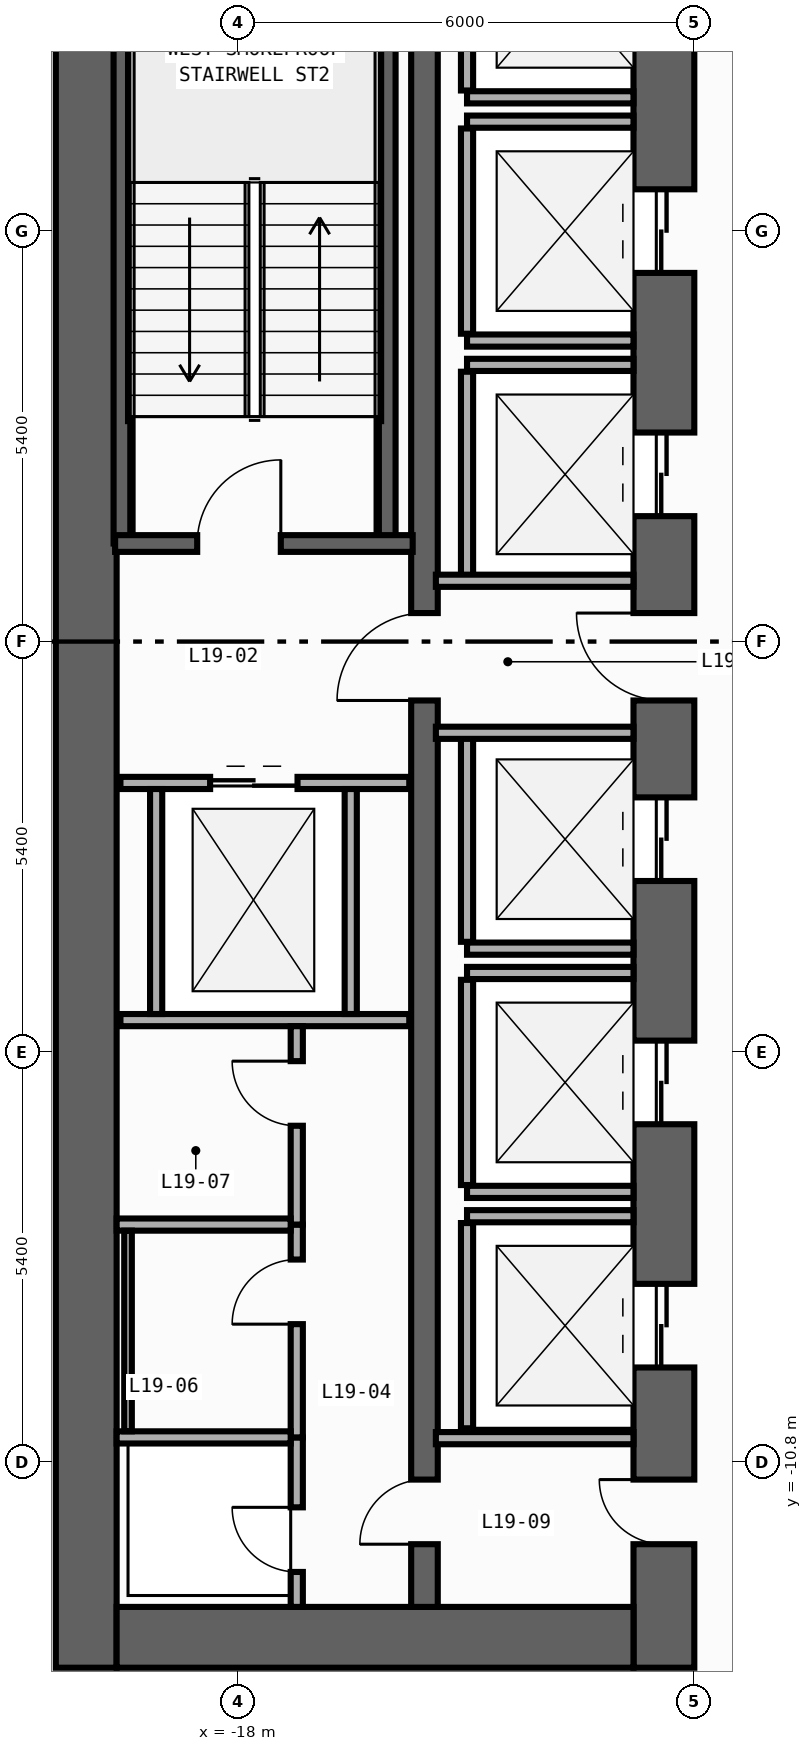
"""IFC4 building model, lengths in metres.
Left out: names, types, materials, properties, quantities, classifications, styles, units other than length and angle.
Written with IfcOpenShell. Run it as: python <this file> out.ifc"""

import sys

from ifc_helpers import new_model, si_unit, direction, frame, frame_2d, origin, place, context, subcontext, project, spatial, rectangle, extrude, element, fill, save


model = new_model("IFC4")
c1 = context("Model", 3, precision=1e-05, world=origin(), true_north=direction((0.0, 1.0)))
c2 = subcontext(c1, "Body", "Model", "MODEL_VIEW")
j1 = project(units=[si_unit("LENGTHUNIT", "METRE"), si_unit("PLANEANGLEUNIT", "RADIAN")], contexts=[c1])
p1 = place(None, origin())
s1 = spatial("IfcSite", under=j1, at=p1, CompositionType="ELEMENT")
p2 = place(p1, origin())
s2 = spatial("IfcBuilding", under=s1, at=p2, CompositionType="ELEMENT")
p3 = place(p2, frame((0.0, 0.0, 80.6)))
s3 = spatial("IfcBuildingStorey", under=s2, at=p3, CompositionType="ELEMENT", Elevation=80.6)
p4 = place(p3, frame((-20.0, -13.5, 0.0), z_axis=(0.0, 0.0, 1.0), x_axis=(0.0, 1.0, 0.0)))
e1 = element("IfcWall", 1, at=p4, inside=s3, PredefinedType="SHEAR", context=c2, shape_type="SweptSolid", body=[
    extrude(rectangle(XDim=27.0, YDim=0.8, at=frame_2d((13.5, 0.0))), origin(), (0.0, 0.0, 1.0), 3.85),
])
p5 = place(p3, frame((-12.4, -13.5, 0.0), z_axis=(0.0, 0.0, 1.0), x_axis=(0.0, 1.0, 0.0)))
e2 = element("IfcWall", 2, at=p5, inside=s3, PredefinedType="SHEAR", context=c2, shape_type="SweptSolid", body=[
    extrude(rectangle(XDim=27.0, YDim=0.8, at=frame_2d((13.5, 0.0))), origin(), (0.0, 0.0, 1.0), 3.85),
])
p6 = place(p5, frame((21.55, 0.0, 0.0)))
e3 = element("IfcOpeningElement", 3, at=p6, cuts=e2, PredefinedType="OPENING", context=c2, shape_type="SweptSolid", body=[
    extrude(rectangle(XDim=1.1, YDim=2.2, at=frame_2d((0.55, 1.1))), frame((0.0, 0.41, 0.0), z_axis=(0.0, -1.0, 0.0), x_axis=(1.0, 0.0, 0.0)), (0.0, 0.0, 1.0), 0.82),
])
p7 = place(p5, frame((18.35, 0.0, 0.0)))
e4 = element("IfcOpeningElement", 4, at=p7, cuts=e2, PredefinedType="OPENING", context=c2, shape_type="SweptSolid", body=[
    extrude(rectangle(XDim=1.1, YDim=2.2, at=frame_2d((0.55, 1.1))), frame((0.0, 0.41, 0.0), z_axis=(0.0, -1.0, 0.0), x_axis=(1.0, 0.0, 0.0)), (0.0, 0.0, 1.0), 0.82),
])
p8 = place(p5, frame((15.15, 0.0, 0.0)))
e5 = element("IfcOpeningElement", 5, at=p8, cuts=e2, PredefinedType="OPENING", context=c2, shape_type="SweptSolid", body=[
    extrude(rectangle(XDim=1.1, YDim=2.2, at=frame_2d((0.55, 1.1))), frame((0.0, 0.41, 0.0), z_axis=(0.0, -1.0, 0.0), x_axis=(1.0, 0.0, 0.0)), (0.0, 0.0, 1.0), 0.82),
])
p9 = place(p5, frame((10.35, 0.0, 0.0)))
e6 = element("IfcOpeningElement", 6, at=p9, cuts=e2, PredefinedType="OPENING", context=c2, shape_type="SweptSolid", body=[
    extrude(rectangle(XDim=1.1, YDim=2.2, at=frame_2d((0.55, 1.1))), frame((0.0, 0.41, 0.0), z_axis=(0.0, -1.0, 0.0), x_axis=(1.0, 0.0, 0.0)), (0.0, 0.0, 1.0), 0.82),
])
p10 = place(p5, frame((7.15, 0.0, 0.0)))
e7 = element("IfcOpeningElement", 7, at=p10, cuts=e2, PredefinedType="OPENING", context=c2, shape_type="SweptSolid", body=[
    extrude(rectangle(XDim=1.1, YDim=2.2, at=frame_2d((0.55, 1.1))), frame((0.0, 0.41, 0.0), z_axis=(0.0, -1.0, 0.0), x_axis=(1.0, 0.0, 0.0)), (0.0, 0.0, 1.0), 0.82),
])
p11 = place(p5, frame((3.95, 0.0, 0.0)))
e8 = element("IfcOpeningElement", 8, at=p11, cuts=e2, PredefinedType="OPENING", context=c2, shape_type="SweptSolid", body=[
    extrude(rectangle(XDim=1.1, YDim=2.2, at=frame_2d((0.55, 1.1))), frame((0.0, 0.41, 0.0), z_axis=(0.0, -1.0, 0.0), x_axis=(1.0, 0.0, 0.0)), (0.0, 0.0, 1.0), 0.82),
])
p12 = place(p5, frame((12.725, 0.0, 0.0)))
e9 = element("IfcOpeningElement", 9, at=p12, cuts=e2, PredefinedType="OPENING", context=c2, shape_type="SweptSolid", body=[
    extrude(rectangle(XDim=1.15, YDim=2.2, at=frame_2d((0.575, 1.1))), frame((0.0, 0.41, 0.0), z_axis=(0.0, -1.0, 0.0), x_axis=(1.0, 0.0, 0.0)), (0.0, 0.0, 1.0), 0.82),
])
p13 = place(p5, frame((1.625, 0.0, 0.0)))
e10 = element("IfcOpeningElement", 10, at=p13, cuts=e2, PredefinedType="OPENING", context=c2, shape_type="SweptSolid", body=[
    extrude(rectangle(XDim=0.85, YDim=2.1, at=frame_2d((0.425, 1.05))), frame((0.0, 0.41, 0.0), z_axis=(0.0, -1.0, 0.0), x_axis=(1.0, 0.0, 0.0)), (0.0, 0.0, 1.0), 0.82),
])
p14 = place(p3, frame((-19.6, -13.1, 0.0), z_axis=(0.0, 0.0, 1.0), x_axis=(1.0, 0.0, 0.0)))
e11 = element("IfcWall", 11, at=p14, inside=s3, PredefinedType="SHEAR", context=c2, shape_type="SweptSolid", body=[
    extrude(rectangle(XDim=6.8, YDim=0.8, at=frame_2d((3.4, 0.0))), origin(), (0.0, 0.0, 1.0), 3.85),
])
p15 = place(p3, frame((-15.55, -12.7, 0.0), z_axis=(0.0, 0.0, 1.0), x_axis=(0.0, 1.0, 0.0)))
e12 = element("IfcWall", 12, at=p15, inside=s3, PredefinedType="SHEAR", context=c2, shape_type="SweptSolid", body=[
    extrude(rectangle(XDim=25.4, YDim=0.35, at=frame_2d((12.7, 0.0))), origin(), (0.0, 0.0, 1.0), 3.85),
])
p16 = place(p15, frame((11.925, 0.0, 0.0)))
e13 = element("IfcOpeningElement", 13, at=p16, cuts=e12, PredefinedType="OPENING", context=c2, shape_type="SweptSolid", body=[
    extrude(rectangle(XDim=1.15, YDim=2.2, at=frame_2d((0.575, 1.1))), frame((0.0, 0.185, 0.0), z_axis=(0.0, -1.0, 0.0), x_axis=(1.0, 0.0, 0.0)), (0.0, 0.0, 1.0), 0.37),
])
p17 = place(p15, frame((0.825, 0.0, 0.0)))
e14 = element("IfcOpeningElement", 14, at=p17, cuts=e12, PredefinedType="OPENING", context=c2, shape_type="SweptSolid", body=[
    extrude(rectangle(XDim=0.85, YDim=2.1, at=frame_2d((0.425, 1.05))), frame((0.0, 0.185, 0.0), z_axis=(0.0, -1.0, 0.0), x_axis=(1.0, 0.0, 0.0)), (0.0, 0.0, 1.0), 0.37),
])
for number, where, z_axis, x_axis in (
    (15, (-16.04, 1.29, 0.0), (0.0, 0.0, 1.0), (0.0, 1.0, 0.0)),
    (16, (-19.53, 1.29, 0.0), (0.0, 0.0, 1.0), (0.0, 1.0, 0.0)),
):
    element("IfcWall", number, at=place(p3, frame(where, z_axis=z_axis, x_axis=x_axis)), inside=s3, PredefinedType="SHEAR", context=c2, shape_type="SweptSolid", body=[
        extrude(rectangle(XDim=11.3, YDim=0.22, at=frame_2d((5.65, 0.0))), origin(), (0.0, 0.0, 1.0), 3.85),
    ])
p18 = place(p3, frame((-19.62, 1.29, 0.0), z_axis=(0.0, 0.0, 1.0), x_axis=(1.0, 0.0, 0.0)))
e17 = element("IfcWall", 17, at=p18, inside=s3, PredefinedType="SHEAR", context=c2, shape_type="SweptSolid", body=[
    extrude(rectangle(XDim=3.915, YDim=0.22, at=frame_2d((1.958, 0.0))), origin(), (0.0, 0.0, 1.0), 3.85),
])
p19 = place(p18, frame((1.08, 0.0, 0.0)))
e18 = element("IfcOpeningElement", 18, at=p19, cuts=e17, PredefinedType="OPENING", context=c2, shape_type="SweptSolid", body=[
    extrude(rectangle(XDim=1.1, YDim=2.2, at=frame_2d((0.55, 1.1))), frame((0.0, 0.12, 0.0), z_axis=(0.0, -1.0, 0.0), x_axis=(1.0, 0.0, 0.0)), (0.0, 0.0, 1.0), 0.24),
])
p20 = place(p3, frame((-14.99, 7.16, 0.0), z_axis=(0.0, 0.0, 1.0), x_axis=(1.0, 0.0, 0.0)))
e19 = element("IfcWall", 19, at=p20, inside=s3, PredefinedType="STANDARD", context=c2, shape_type="SweptSolid", body=[
    extrude(rectangle(XDim=2.19, YDim=0.16, at=frame_2d((1.095, 0.0))), origin(), (0.0, 0.0, 1.0), 3.85),
])
p21 = place(p3, frame((-14.99, 7.25, 0.0), z_axis=(0.0, 0.0, 1.0), x_axis=(0.0, 1.0, 0.0)))
e20 = element("IfcWall", 20, at=p21, inside=s3, PredefinedType="STANDARD", context=c2, shape_type="SweptSolid", body=[
    extrude(rectangle(XDim=2.7, YDim=0.16, at=frame_2d((1.35, 0.0))), origin(), (0.0, 0.0, 1.0), 3.85),
])
for number, where, z_axis, x_axis in (
    (21, (-14.99, 3.96, 0.0), (0.0, 0.0, 1.0), (1.0, 0.0, 0.0)),
    (22, (-14.99, 6.84, 0.0), (0.0, 0.0, 1.0), (1.0, 0.0, 0.0)),
):
    element("IfcWall", number, at=place(p3, frame(where, z_axis=z_axis, x_axis=x_axis)), inside=s3, PredefinedType="STANDARD", context=c2, shape_type="SweptSolid", body=[
        extrude(rectangle(XDim=2.19, YDim=0.16, at=frame_2d((1.095, 0.0))), origin(), (0.0, 0.0, 1.0), 3.85),
    ])
p22 = place(p3, frame((-14.99, 4.05, 0.0), z_axis=(0.0, 0.0, 1.0), x_axis=(0.0, 1.0, 0.0)))
e23 = element("IfcWall", 23, at=p22, inside=s3, PredefinedType="STANDARD", context=c2, shape_type="SweptSolid", body=[
    extrude(rectangle(XDim=2.7, YDim=0.16, at=frame_2d((1.35, 0.0))), origin(), (0.0, 0.0, 1.0), 3.85),
])
p23 = place(p3, frame((-14.99, 3.64, 0.0), z_axis=(0.0, 0.0, 1.0), x_axis=(1.0, 0.0, 0.0)))
e24 = element("IfcWall", 24, at=p23, inside=s3, PredefinedType="STANDARD", context=c2, shape_type="SweptSolid", body=[
    extrude(rectangle(XDim=2.19, YDim=0.16, at=frame_2d((1.095, 0.0))), origin(), (0.0, 0.0, 1.0), 3.85),
])
p24 = place(p3, frame((-14.99, 0.85, 0.0), z_axis=(0.0, 0.0, 1.0), x_axis=(0.0, 1.0, 0.0)))
e25 = element("IfcWall", 25, at=p24, inside=s3, PredefinedType="STANDARD", context=c2, shape_type="SweptSolid", body=[
    extrude(rectangle(XDim=2.7, YDim=0.16, at=frame_2d((1.35, 0.0))), origin(), (0.0, 0.0, 1.0), 3.85),
])
p25 = place(p3, frame((-14.99, -4.04, 0.0), z_axis=(0.0, 0.0, 1.0), x_axis=(1.0, 0.0, 0.0)))
e26 = element("IfcWall", 26, at=p25, inside=s3, PredefinedType="STANDARD", context=c2, shape_type="SweptSolid", body=[
    extrude(rectangle(XDim=2.19, YDim=0.16, at=frame_2d((1.095, 0.0))), origin(), (0.0, 0.0, 1.0), 3.85),
])
p26 = place(p3, frame((-14.99, -3.95, 0.0), z_axis=(0.0, 0.0, 1.0), x_axis=(0.0, 1.0, 0.0)))
e27 = element("IfcWall", 27, at=p26, inside=s3, PredefinedType="STANDARD", context=c2, shape_type="SweptSolid", body=[
    extrude(rectangle(XDim=2.7, YDim=0.16, at=frame_2d((1.35, 0.0))), origin(), (0.0, 0.0, 1.0), 3.85),
])
for number, where, z_axis, x_axis in (
    (28, (-14.99, -7.24, 0.0), (0.0, 0.0, 1.0), (1.0, 0.0, 0.0)),
    (29, (-14.99, -4.36, 0.0), (0.0, 0.0, 1.0), (1.0, 0.0, 0.0)),
):
    element("IfcWall", number, at=place(p3, frame(where, z_axis=z_axis, x_axis=x_axis)), inside=s3, PredefinedType="STANDARD", context=c2, shape_type="SweptSolid", body=[
        extrude(rectangle(XDim=2.19, YDim=0.16, at=frame_2d((1.095, 0.0))), origin(), (0.0, 0.0, 1.0), 3.85),
    ])
p27 = place(p3, frame((-14.99, -7.15, 0.0), z_axis=(0.0, 0.0, 1.0), x_axis=(0.0, 1.0, 0.0)))
e30 = element("IfcWall", 30, at=p27, inside=s3, PredefinedType="STANDARD", context=c2, shape_type="SweptSolid", body=[
    extrude(rectangle(XDim=2.7, YDim=0.16, at=frame_2d((1.35, 0.0))), origin(), (0.0, 0.0, 1.0), 3.85),
])
p28 = place(p3, frame((-14.99, -7.56, 0.0), z_axis=(0.0, 0.0, 1.0), x_axis=(1.0, 0.0, 0.0)))
e31 = element("IfcWall", 31, at=p28, inside=s3, PredefinedType="STANDARD", context=c2, shape_type="SweptSolid", body=[
    extrude(rectangle(XDim=2.19, YDim=0.16, at=frame_2d((1.095, 0.0))), origin(), (0.0, 0.0, 1.0), 3.85),
])
p29 = place(p3, frame((-14.99, -10.35, 0.0), z_axis=(0.0, 0.0, 1.0), x_axis=(0.0, 1.0, 0.0)))
e32 = element("IfcWall", 32, at=p29, inside=s3, PredefinedType="STANDARD", context=c2, shape_type="SweptSolid", body=[
    extrude(rectangle(XDim=2.7, YDim=0.16, at=frame_2d((1.35, 0.0))), origin(), (0.0, 0.0, 1.0), 3.85),
])
p30 = place(p3, frame((-19.55, -1.86, 0.0), z_axis=(0.0, 0.0, 1.0), x_axis=(1.0, 0.0, 0.0)))
e33 = element("IfcWall", 33, at=p30, inside=s3, PredefinedType="STANDARD", context=c2, shape_type="SweptSolid", body=[
    extrude(rectangle(XDim=3.8, YDim=0.16, at=frame_2d((1.9, 0.0))), origin(), (0.0, 0.0, 1.0), 3.85),
])
p31 = place(p30, frame((1.18, 0.0, 0.0)))
e34 = element("IfcOpeningElement", 34, at=p31, cuts=e33, PredefinedType="OPENING", context=c2, shape_type="SweptSolid", body=[
    extrude(rectangle(XDim=1.15, YDim=2.2, at=frame_2d((0.575, 1.1))), frame((0.0, 0.09, 0.0), z_axis=(0.0, -1.0, 0.0), x_axis=(1.0, 0.0, 0.0)), (0.0, 0.0, 1.0), 0.18),
])
p32 = place(p3, frame((-19.55, -4.98, 0.0), z_axis=(0.0, 0.0, 1.0), x_axis=(1.0, 0.0, 0.0)))
e35 = element("IfcWall", 35, at=p32, inside=s3, PredefinedType="STANDARD", context=c2, shape_type="SweptSolid", body=[
    extrude(rectangle(XDim=3.8, YDim=0.16, at=frame_2d((1.9, 0.0))), origin(), (0.0, 0.0, 1.0), 3.85),
])
for number, where, z_axis, x_axis in (
    (36, (-19.08, -4.9, 0.0), (0.0, 0.0, 1.0), (0.0, 1.0, 0.0)),
    (37, (-16.52, -4.9, 0.0), (0.0, 0.0, 1.0), (0.0, 1.0, 0.0)),
):
    element("IfcWall", number, at=place(p3, frame(where, z_axis=z_axis, x_axis=x_axis)), inside=s3, PredefinedType="STANDARD", context=c2, shape_type="SweptSolid", body=[
        extrude(rectangle(XDim=2.96, YDim=0.16, at=frame_2d((1.48, 0.0))), origin(), (0.0, 0.0, 1.0), 3.85),
    ])
for number, where, z_axis, x_axis in (
    (38, (-15.4, 0.8, 0.0), (0.0, 0.0, 1.0), (1.0, 0.0, 0.0)),
    (39, (-15.4, -1.2, 0.0), (0.0, 0.0, 1.0), (1.0, 0.0, 0.0)),
    (40, (-15.4, -10.48, 0.0), (0.0, 0.0, 1.0), (1.0, 0.0, 0.0)),
):
    element("IfcWall", number, at=place(p3, frame(where, z_axis=z_axis, x_axis=x_axis)), inside=s3, PredefinedType="STANDARD", context=c2, shape_type="SweptSolid", body=[
        extrude(rectangle(XDim=2.6, YDim=0.16, at=frame_2d((1.3, 0.0))), origin(), (0.0, 0.0, 1.0), 3.85),
    ])
p33 = place(p3, frame((-17.23, -12.7, 0.0), z_axis=(0.0, 0.0, 1.0), x_axis=(0.0, 1.0, 0.0)))
e41 = element("IfcWall", 41, at=p33, inside=s3, PredefinedType="PARTITIONING", context=c2, shape_type="SweptSolid", body=[
    extrude(rectangle(XDim=2.23, YDim=0.16, at=frame_2d((1.115, 0.0))), origin(), (0.0, 0.0, 1.0), 3.85),
])
p34 = place(p33, frame((0.46, 0.0, 0.0)))
e42 = element("IfcOpeningElement", 42, at=p34, cuts=e41, PredefinedType="OPENING", context=c2, shape_type="SweptSolid", body=[
    extrude(rectangle(XDim=0.85, YDim=2.1, at=frame_2d((0.425, 1.05))), frame((0.0, 0.09, 0.0), z_axis=(0.0, -1.0, 0.0), x_axis=(1.0, 0.0, 0.0)), (0.0, 0.0, 1.0), 0.18),
])
p35 = place(p3, frame((-17.23, -10.47, 0.0), z_axis=(0.0, 0.0, 1.0), x_axis=(0.0, 1.0, 0.0)))
e43 = element("IfcWall", 43, at=p35, inside=s3, PredefinedType="PARTITIONING", context=c2, shape_type="SweptSolid", body=[
    extrude(rectangle(XDim=2.8, YDim=0.16, at=frame_2d((1.4, 0.0))), origin(), (0.0, 0.0, 1.0), 3.85),
])
p36 = place(p35, frame((1.49, 0.0, 0.0)))
e44 = element("IfcOpeningElement", 44, at=p36, cuts=e43, PredefinedType="OPENING", context=c2, shape_type="SweptSolid", body=[
    extrude(rectangle(XDim=0.85, YDim=2.1, at=frame_2d((0.425, 1.05))), frame((0.0, 0.09, 0.0), z_axis=(0.0, -1.0, 0.0), x_axis=(1.0, 0.0, 0.0)), (0.0, 0.0, 1.0), 0.18),
])
p37 = place(p3, frame((-17.23, -7.67, 0.0), z_axis=(0.0, 0.0, 1.0), x_axis=(0.0, 1.0, 0.0)))
e45 = element("IfcWall", 45, at=p37, inside=s3, PredefinedType="PARTITIONING", context=c2, shape_type="SweptSolid", body=[
    extrude(rectangle(XDim=2.61, YDim=0.16, at=frame_2d((1.305, 0.0))), origin(), (0.0, 0.0, 1.0), 3.85),
])
p38 = place(p37, frame((1.3, 0.0, 0.0)))
e46 = element("IfcOpeningElement", 46, at=p38, cuts=e45, PredefinedType="OPENING", context=c2, shape_type="SweptSolid", body=[
    extrude(rectangle(XDim=0.85, YDim=2.1, at=frame_2d((0.425, 1.05))), frame((0.0, 0.09, 0.0), z_axis=(0.0, -1.0, 0.0), x_axis=(1.0, 0.0, 0.0)), (0.0, 0.0, 1.0), 0.18),
])
for number, where, z_axis, x_axis in (
    (47, (-19.6, -10.47, 0.0), (0.0, 0.0, 1.0), (1.0, 0.0, 0.0)),
    (48, (-19.6, -7.67, 0.0), (0.0, 0.0, 1.0), (1.0, 0.0, 0.0)),
):
    element("IfcWall", number, at=place(p3, frame(where, z_axis=z_axis, x_axis=x_axis)), inside=s3, PredefinedType="PARTITIONING", context=c2, shape_type="SweptSolid", body=[
        extrude(rectangle(XDim=2.29, YDim=0.16, at=frame_2d((1.145, 0.0))), origin(), (0.0, 0.0, 1.0), 3.85),
    ])
p39 = place(p3, frame((-19.45, -10.39, 0.0), z_axis=(0.0, 0.0, 1.0), x_axis=(0.0, 1.0, 0.0)))
e49 = element("IfcWall", 49, at=p39, inside=s3, PredefinedType="PARTITIONING", context=c2, shape_type="SweptSolid", body=[
    extrude(rectangle(XDim=2.64, YDim=0.1, at=frame_2d((1.32, 0.0))), origin(), (0.0, 0.0, 1.0), 3.85),
])
p40 = place(p19, origin())
e50 = element("IfcDoor", 50, at=p40, inside=s3, OperationType="SINGLE_SWING_RIGHT", PredefinedType="DOOR", context=c2, shape_type="SweptSolid", body=[
    extrude(rectangle(XDim=1.1, YDim=2.2, at=frame_2d((0.55, 1.1))), frame((0.0, 0.025, 0.0), z_axis=(0.0, -1.0, 0.0), x_axis=(1.0, 0.0, 0.0)), (0.0, 0.0, 1.0), 0.05),
])
fill(e18, e50)
p41 = place(p7, origin())
e51 = element("IfcDoor", 51, at=p41, inside=s3, OperationType="DOUBLE_DOOR_SLIDING", PredefinedType="DOOR", context=c2, shape_type="SweptSolid", body=[
    extrude(rectangle(XDim=1.1, YDim=2.2, at=frame_2d((0.55, 1.1))), frame((0.0, 0.025, 0.0), z_axis=(0.0, -1.0, 0.0), x_axis=(1.0, 0.0, 0.0)), (0.0, 0.0, 1.0), 0.05),
])
fill(e4, e51)
p42 = place(p8, origin())
e52 = element("IfcDoor", 52, at=p42, inside=s3, OperationType="DOUBLE_DOOR_SLIDING", PredefinedType="DOOR", context=c2, shape_type="SweptSolid", body=[
    extrude(rectangle(XDim=1.1, YDim=2.2, at=frame_2d((0.55, 1.1))), frame((0.0, 0.025, 0.0), z_axis=(0.0, -1.0, 0.0), x_axis=(1.0, 0.0, 0.0)), (0.0, 0.0, 1.0), 0.05),
])
fill(e5, e52)
p43 = place(p9, origin())
e53 = element("IfcDoor", 53, at=p43, inside=s3, OperationType="DOUBLE_DOOR_SLIDING", PredefinedType="DOOR", context=c2, shape_type="SweptSolid", body=[
    extrude(rectangle(XDim=1.1, YDim=2.2, at=frame_2d((0.55, 1.1))), frame((0.0, 0.025, 0.0), z_axis=(0.0, -1.0, 0.0), x_axis=(1.0, 0.0, 0.0)), (0.0, 0.0, 1.0), 0.05),
])
fill(e6, e53)
p44 = place(p10, origin())
e54 = element("IfcDoor", 54, at=p44, inside=s3, OperationType="DOUBLE_DOOR_SLIDING", PredefinedType="DOOR", context=c2, shape_type="SweptSolid", body=[
    extrude(rectangle(XDim=1.1, YDim=2.2, at=frame_2d((0.55, 1.1))), frame((0.0, 0.025, 0.0), z_axis=(0.0, -1.0, 0.0), x_axis=(1.0, 0.0, 0.0)), (0.0, 0.0, 1.0), 0.05),
])
fill(e7, e54)
p45 = place(p11, origin())
e55 = element("IfcDoor", 55, at=p45, inside=s3, OperationType="DOUBLE_DOOR_SLIDING", PredefinedType="DOOR", context=c2, shape_type="SweptSolid", body=[
    extrude(rectangle(XDim=1.1, YDim=2.2, at=frame_2d((0.55, 1.1))), frame((0.0, 0.025, 0.0), z_axis=(0.0, -1.0, 0.0), x_axis=(1.0, 0.0, 0.0)), (0.0, 0.0, 1.0), 0.05),
])
fill(e8, e55)
p46 = place(p12, origin())
e56 = element("IfcDoor", 56, at=p46, inside=s3, OperationType="SINGLE_SWING_RIGHT", PredefinedType="DOOR", context=c2, shape_type="SweptSolid", body=[
    extrude(rectangle(XDim=1.15, YDim=2.2, at=frame_2d((0.575, 1.1))), frame((0.0, 0.025, 0.0), z_axis=(0.0, -1.0, 0.0), x_axis=(1.0, 0.0, 0.0)), (0.0, 0.0, 1.0), 0.05),
])
fill(e9, e56)
p47 = place(p16, origin())
e57 = element("IfcDoor", 57, at=p47, inside=s3, OperationType="SINGLE_SWING_LEFT", PredefinedType="DOOR", context=c2, shape_type="SweptSolid", body=[
    extrude(rectangle(XDim=1.15, YDim=2.2, at=frame_2d((0.575, 1.1))), frame((0.0, 0.025, 0.0), z_axis=(0.0, -1.0, 0.0), x_axis=(1.0, 0.0, 0.0)), (0.0, 0.0, 1.0), 0.05),
])
fill(e13, e57)
p48 = place(p13, origin())
e58 = element("IfcDoor", 58, at=p48, inside=s3, OperationType="SINGLE_SWING_RIGHT", PredefinedType="DOOR", context=c2, shape_type="SweptSolid", body=[
    extrude(rectangle(XDim=0.85, YDim=2.1, at=frame_2d((0.425, 1.05))), frame((0.0, 0.025, 0.0), z_axis=(0.0, -1.0, 0.0), x_axis=(1.0, 0.0, 0.0)), (0.0, 0.0, 1.0), 0.05),
])
fill(e10, e58)
p49 = place(p17, origin())
e59 = element("IfcDoor", 59, at=p49, inside=s3, OperationType="SINGLE_SWING_LEFT", PredefinedType="DOOR", context=c2, shape_type="SweptSolid", body=[
    extrude(rectangle(XDim=0.85, YDim=2.1, at=frame_2d((0.425, 1.05))), frame((0.0, 0.025, 0.0), z_axis=(0.0, -1.0, 0.0), x_axis=(1.0, 0.0, 0.0)), (0.0, 0.0, 1.0), 0.05),
])
fill(e14, e59)
p50 = place(p31, origin())
e60 = element("IfcDoor", 60, at=p50, inside=s3, OperationType="DOUBLE_DOOR_SLIDING", PredefinedType="DOOR", context=c2, shape_type="SweptSolid", body=[
    extrude(rectangle(XDim=1.15, YDim=2.2, at=frame_2d((0.575, 1.1))), frame((0.0, 0.025, 0.0), z_axis=(0.0, -1.0, 0.0), x_axis=(1.0, 0.0, 0.0)), (0.0, 0.0, 1.0), 0.05),
])
fill(e34, e60)
p51 = place(p34, origin())
e61 = element("IfcDoor", 61, at=p51, inside=s3, OperationType="SINGLE_SWING_RIGHT", PredefinedType="DOOR", context=c2, shape_type="SweptSolid", body=[
    extrude(rectangle(XDim=0.85, YDim=2.1, at=frame_2d((0.425, 1.05))), frame((0.0, 0.025, 0.0), z_axis=(0.0, -1.0, 0.0), x_axis=(1.0, 0.0, 0.0)), (0.0, 0.0, 1.0), 0.05),
])
fill(e42, e61)
p52 = place(p36, origin())
e62 = element("IfcDoor", 62, at=p52, inside=s3, OperationType="SINGLE_SWING_LEFT", PredefinedType="DOOR", context=c2, shape_type="SweptSolid", body=[
    extrude(rectangle(XDim=0.85, YDim=2.1, at=frame_2d((0.425, 1.05))), frame((0.0, 0.025, 0.0), z_axis=(0.0, -1.0, 0.0), x_axis=(1.0, 0.0, 0.0)), (0.0, 0.0, 1.0), 0.05),
])
fill(e44, e62)
p53 = place(p38, origin())
e63 = element("IfcDoor", 63, at=p53, inside=s3, OperationType="SINGLE_SWING_RIGHT", PredefinedType="DOOR", context=c2, shape_type="SweptSolid", body=[
    extrude(rectangle(XDim=0.85, YDim=2.1, at=frame_2d((0.425, 1.05))), frame((0.0, 0.025, 0.0), z_axis=(0.0, -1.0, 0.0), x_axis=(1.0, 0.0, 0.0)), (0.0, 0.0, 1.0), 0.05),
])
fill(e46, e63)
save(model, sys.argv[1])
